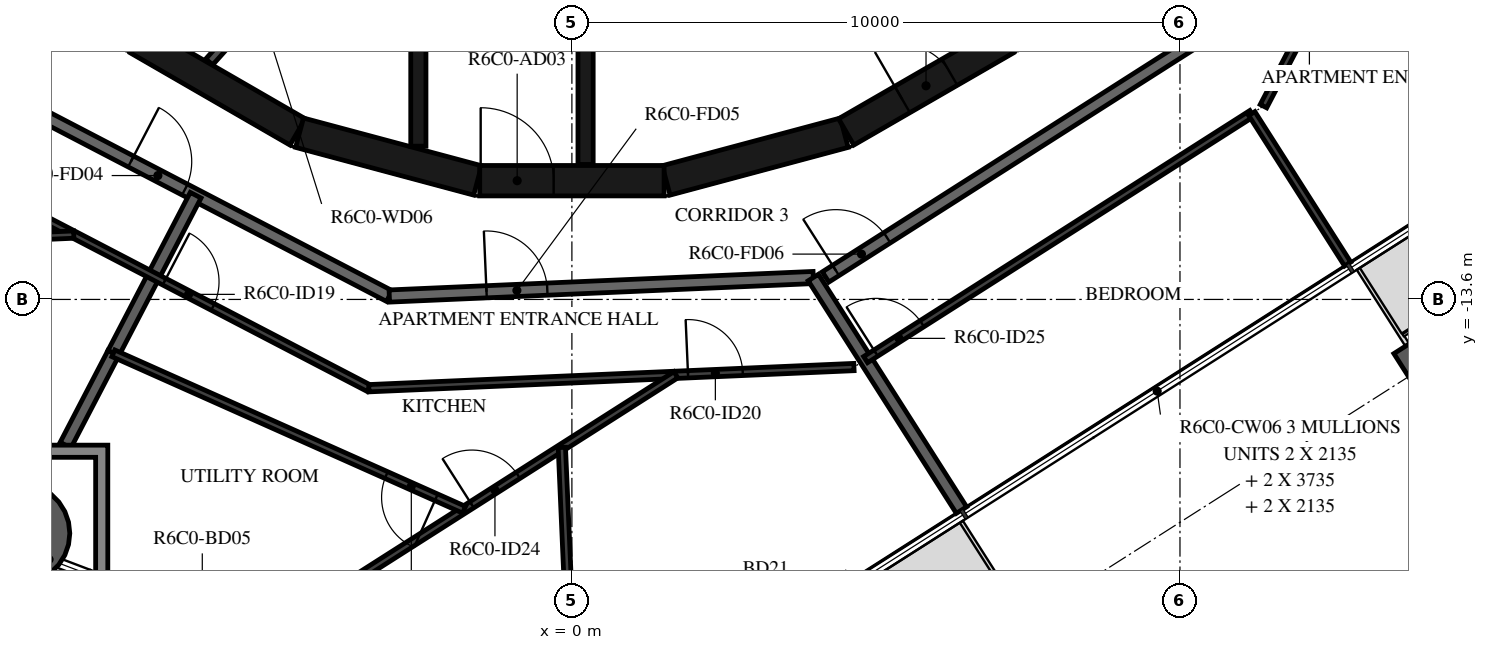
"""IFC4 building model, lengths in metres.
Left out: names, types, materials, properties, quantities, classifications, styles, units other than length and angle.
Written with IfcOpenShell. Run it as: python <this file> out.ifc"""

import sys

from ifc_helpers import new_model, si_unit, direction, frame, frame_2d, origin, origin_2d, place, context, subcontext, project, spatial, polyline, rectangle, hollow_circle, i_section, outline, extrude, element, fill, save


model = new_model("IFC4")
c1 = context("Model", 3, precision=1e-05, world=origin(), true_north=direction((0.0, 1.0)))
c2 = subcontext(c1, "Body", "Model", "MODEL_VIEW")
j1 = project(units=[si_unit("LENGTHUNIT", "METRE"), si_unit("PLANEANGLEUNIT", "RADIAN")], contexts=[c1])
p1 = place(None, origin())
s1 = spatial("IfcSite", under=j1, at=p1, CompositionType="ELEMENT")
p2 = place(p1, origin())
s2 = spatial("IfcBuilding", under=s1, at=p2, CompositionType="ELEMENT")
p3 = place(p2, frame((0.0, 0.0, 254.7)))
s3 = spatial("IfcBuildingStorey", under=s2, at=p3, CompositionType="ELEMENT", Elevation=254.7)
p4 = place(p3, frame((-9.082, -17.446, -0.38), z_axis=(0.0, 0.0, 1.0), x_axis=(1.0, 0.0, 0.0)))
e1 = element("IfcColumn", 1, at=p4, inside=s3, PredefinedType="COLUMN", context=c2, shape_type="SweptSolid", body=[
    extrude(hollow_circle(Radius=0.825, WallThickness=0.04, at=origin_2d()), origin(), (0.0, 0.0, 1.0), 2.616),
])
p5 = place(p3, frame((13.886, -14.79, -0.38), z_axis=(0.0, 0.0, 1.0), x_axis=(-0.843391139633, -0.537300088953, 0.0)))
e2 = element("IfcColumn", 2, at=p5, inside=s3, PredefinedType="COLUMN", context=c2, shape_type="SweptSolid", body=[
    extrude(i_section(OverallWidth=0.3, OverallDepth=0.9, WebThickness=0.019, FlangeThickness=0.035, FilletRadius=0.03, at=origin_2d()), origin(), (0.0, 0.0, 1.0), 2.616),
])
p6 = place(p3, frame((1.55, -11.643, 0.0), z_axis=(0.0, 0.0, 1.0), x_axis=(0.965948410781, 0.258734743916, 0.0)))
e3 = element("IfcWall", 3, at=p6, inside=s3, PredefinedType="SHEAR", context=c2, shape_type="SweptSolid", body=[
    extrude(rectangle(XDim=3.033, YDim=0.5, at=frame_2d((1.516, 0.0))), origin(), (0.0, 0.0, 1.0), 3.05),
])
p7 = place(p3, frame((4.51, -10.845, 0.0), z_axis=(0.0, 0.0, 1.0), x_axis=(0.865975092491, 0.500087131594, 0.0)))
e4 = element("IfcWall", 4, at=p7, inside=s3, PredefinedType="SHEAR", context=c2, shape_type="SweptSolid", body=[
    extrude(rectangle(XDim=3.033, YDim=0.5, at=frame_2d((1.516, 0.0))), origin(), (0.0, 0.0, 1.0), 3.05),
])
p8 = place(p7, frame((1.066, 0.0, 0.0)))
e5 = element("IfcOpeningElement", 5, at=p8, cuts=e4, PredefinedType="OPENING", context=c2, shape_type="SweptSolid", body=[
    extrude(rectangle(XDim=0.9, YDim=2.1, at=frame_2d((0.45, 1.05))), frame((0.0, 0.26, 0.0), z_axis=(0.0, -1.0, 0.0), x_axis=(1.0, 0.0, 0.0)), (0.0, 0.0, 1.0), 0.52),
])
for number, where, z_axis, x_axis in (
    (6, (-7.137, -9.329, 0.0), (0.0, 0.0, 1.0), (0.866, -0.5, 0.0)),
    (7, (-4.479, -10.858, 0.0), (0.0, 0.0, 1.0), (0.966, -0.259, 0.0)),
):
    element("IfcWall", number, at=place(p3, frame(where, z_axis=z_axis, x_axis=x_axis)), inside=s3, PredefinedType="SHEAR", context=c2, shape_type="SweptSolid", body=[
        extrude(rectangle(XDim=3.033, YDim=0.5, at=frame_2d((1.516, 0.0))), origin(), (0.0, 0.0, 1.0), 3.05),
    ])
p9 = place(p3, frame((-1.516, -11.647, 0.0), z_axis=(0.0, 0.0, 1.0), x_axis=(1.0, 0.0, 0.0)))
e8 = element("IfcWall", 8, at=p9, inside=s3, PredefinedType="SHEAR", context=c2, shape_type="SweptSolid", body=[
    extrude(rectangle(XDim=3.033, YDim=0.5, at=frame_2d((1.516, 0.0))), origin(), (0.0, 0.0, 1.0), 3.05),
])
p10 = place(p9, frame((0.016, 0.0, 0.0)))
e9 = element("IfcOpeningElement", 9, at=p10, cuts=e8, PredefinedType="OPENING", context=c2, shape_type="SweptSolid", body=[
    extrude(rectangle(XDim=1.2, YDim=2.1, at=frame_2d((0.6, 1.05))), frame((0.0, 0.26, 0.0), z_axis=(0.0, -1.0, 0.0), x_axis=(1.0, 0.0, 0.0)), (0.0, 0.0, 1.0), 0.52),
])
p11 = place(p3, frame((-2.525, -8.97, 0.0), z_axis=(0.0, 0.0, 1.0), x_axis=(0.0, -1.0, 0.0)))
e10 = element("IfcWall", 10, at=p11, inside=s3, PredefinedType="SHEAR", context=c2, shape_type="SweptSolid", body=[
    extrude(rectangle(XDim=2.11, YDim=0.25, at=frame_2d((1.055, 0.0))), origin(), (0.0, 0.0, 1.0), 3.05),
])
p12 = place(p3, frame((0.225, -8.97, 0.0), z_axis=(0.0, 0.0, 1.0), x_axis=(0.0, -1.0, 0.0)))
e11 = element("IfcWall", 11, at=p12, inside=s3, PredefinedType="SHEAR", context=c2, shape_type="SweptSolid", body=[
    extrude(rectangle(XDim=2.41, YDim=0.25, at=frame_2d((1.205, 0.0))), origin(), (0.0, 0.0, 1.0), 3.05),
])
p13 = place(p3, frame((-4.311, -7.851, 0.0), z_axis=(0.0, 0.0, 1.0), x_axis=(-0.667869133096, -0.744278725383, 0.0)))
e12 = element("IfcWall", 12, at=p13, inside=s3, PredefinedType="PARTITIONING", context=c2, shape_type="SweptSolid", body=[
    extrude(rectangle(XDim=2.476, YDim=0.15, at=frame_2d((1.238, 0.0))), origin(), (0.0, 0.0, 1.0), 3.05),
])
p14 = place(p13, frame((0.788, 0.0, 0.0)))
e13 = element("IfcOpeningElement", 13, at=p14, cuts=e12, PredefinedType="OPENING", context=c2, shape_type="SweptSolid", body=[
    extrude(rectangle(XDim=0.9, YDim=2.1, at=frame_2d((0.45, 1.05))), frame((0.0, 0.085, 0.0), z_axis=(0.0, -1.0, 0.0), x_axis=(1.0, 0.0, 0.0)), (0.0, 0.0, 1.0), 0.17),
])
p15 = place(p3, frame((-9.372, -10.228, 0.0), z_axis=(0.0, 0.0, 1.0), x_axis=(0.887005184532, -0.461759464021, 0.0)))
e14 = element("IfcWall", 14, at=p15, inside=s3, PredefinedType="STANDARD", context=c2, shape_type="SweptSolid", body=[
    extrude(rectangle(XDim=7.181, YDim=0.2, at=frame_2d((3.591, 0.0))), origin(), (0.0, 0.0, 1.0), 3.05),
])
p16 = place(p15, frame((2.391, 0.0, 0.0)))
e15 = element("IfcOpeningElement", 15, at=p16, cuts=e14, PredefinedType="OPENING", context=c2, shape_type="SweptSolid", body=[
    extrude(rectangle(XDim=1.0, YDim=2.1, at=frame_2d((0.5, 1.05))), frame((0.0, 0.11, 0.0), z_axis=(0.0, -1.0, 0.0), x_axis=(1.0, 0.0, 0.0)), (0.0, 0.0, 1.0), 0.22),
])
p17 = place(p3, frame((-3.003, -13.544, 0.0), z_axis=(0.0, 0.0, 1.0), x_axis=(0.999048221872, 0.043619380718, 0.0)))
e16 = element("IfcWall", 16, at=p17, inside=s3, PredefinedType="STANDARD", context=c2, shape_type="SweptSolid", body=[
    extrude(rectangle(XDim=6.979, YDim=0.2, at=frame_2d((3.49, 0.0))), origin(), (0.0, 0.0, 1.0), 3.05),
])
p18 = place(p17, frame((1.6, 0.0, 0.0)))
e17 = element("IfcOpeningElement", 17, at=p18, cuts=e16, PredefinedType="OPENING", context=c2, shape_type="SweptSolid", body=[
    extrude(rectangle(XDim=1.0, YDim=2.1, at=frame_2d((0.5, 1.05))), frame((0.0, 0.11, 0.0), z_axis=(0.0, -1.0, 0.0), x_axis=(1.0, 0.0, 0.0)), (0.0, 0.0, 1.0), 0.22),
])
p19 = place(p3, frame((4.172, -13.231, 0.0), z_axis=(0.0, 0.0, 1.0), x_axis=(0.843388394728, 0.537304397561, 0.0)))
e18 = element("IfcWall", 18, at=p19, inside=s3, PredefinedType="STANDARD", context=c2, shape_type="SweptSolid", body=[
    extrude(rectangle(XDim=7.181, YDim=0.2, at=frame_2d((3.59, 0.0))), origin(), (0.0, 0.0, 1.0), 3.05),
])
p20 = place(p19, frame((0.2, 0.0, 0.0)))
e19 = element("IfcOpeningElement", 19, at=p20, cuts=e18, PredefinedType="OPENING", context=c2, shape_type="SweptSolid", body=[
    extrude(rectangle(XDim=1.0, YDim=2.1, at=frame_2d((0.5, 1.05))), frame((0.0, 0.11, 0.0), z_axis=(0.0, -1.0, 0.0), x_axis=(1.0, 0.0, 0.0)), (0.0, 0.0, 1.0), 0.22),
])
p21 = place(p3, frame((-7.541, -14.486, 0.0), z_axis=(0.0, 0.0, 1.0), x_axis=(0.461746051786, 0.88701216658, 0.0)))
e20 = element("IfcWall", 20, at=p21, inside=s3, PredefinedType="STANDARD", context=c2, shape_type="SweptSolid", body=[
    extrude(rectangle(XDim=2.931, YDim=0.2, at=frame_2d((1.466, 0.0))), origin(), (0.0, 0.0, 1.0), 3.05),
])
p22 = place(p3, frame((-8.327, -15.996, 0.0), z_axis=(0.0, 0.0, 1.0), x_axis=(0.461722915657, 0.887024210017, 0.0)))
e21 = element("IfcWall", 21, at=p22, inside=s3, PredefinedType="STANDARD", context=c2, shape_type="SweptSolid", body=[
    extrude(rectangle(XDim=1.703, YDim=0.2, at=frame_2d((0.851, 0.0))), origin(), (0.0, 0.0, 1.0), 3.05),
])
p23 = place(p3, frame((6.407, -17.064, 0.0), z_axis=(0.0, 0.0, 1.0), x_axis=(-0.537324777979, 0.843375410461, 0.0)))
e22 = element("IfcWall", 22, at=p23, inside=s3, PredefinedType="STANDARD", context=c2, shape_type="SweptSolid", body=[
    extrude(rectangle(XDim=4.535, YDim=0.2, at=frame_2d((2.268, 0.0))), origin(), (0.0, 0.0, 1.0), 3.05),
])
p24 = place(p3, frame((-10.421, -11.373, 0.0), z_axis=(0.0, 0.0, 1.0), x_axis=(0.887012970857, -0.461744506769, 0.0)))
e23 = element("IfcWall", 23, at=p24, inside=s3, PredefinedType="PARTITIONING", context=c2, shape_type="SweptSolid", body=[
    extrude(rectangle(XDim=7.985, YDim=0.12, at=frame_2d((3.992, 0.0))), origin(), (0.0, 0.0, 1.0), 3.05),
])
p25 = place(p24, frame((4.192, 0.0, 0.0)))
e24 = element("IfcOpeningElement", 24, at=p25, cuts=e23, PredefinedType="OPENING", context=c2, shape_type="SweptSolid", body=[
    extrude(rectangle(XDim=0.9, YDim=2.1, at=frame_2d((0.45, 1.05))), frame((0.0, 0.07, 0.0), z_axis=(0.0, -1.0, 0.0), x_axis=(1.0, 0.0, 0.0)), (0.0, 0.0, 1.0), 0.14),
])
p26 = place(p3, frame((-13.69, -12.774, 0.0), z_axis=(0.0, 0.0, 1.0), x_axis=(0.999048778431, 0.043606631553, 0.0)))
e25 = element("IfcWall", 25, at=p26, inside=s3, PredefinedType="PARTITIONING", context=c2, shape_type="SweptSolid", body=[
    extrude(rectangle(XDim=5.503, YDim=0.12, at=frame_2d((2.752, 0.0))), origin(), (0.0, 0.0, 1.0), 3.05),
])
p27 = place(p26, frame((0.6, 0.0, 0.0)))
e26 = element("IfcOpeningElement", 26, at=p27, cuts=e25, PredefinedType="OPENING", context=c2, shape_type="SweptSolid", body=[
    extrude(rectangle(XDim=0.9, YDim=2.1, at=frame_2d((0.45, 1.05))), frame((0.0, 0.07, 0.0), z_axis=(0.0, -1.0, 0.0), x_axis=(1.0, 0.0, 0.0)), (0.0, 0.0, 1.0), 0.14),
])
p28 = place(p3, frame((-3.339, -15.06, 0.0), z_axis=(0.0, 0.0, 1.0), x_axis=(0.999047716945, 0.043630943905, 0.0)))
e27 = element("IfcWall", 27, at=p28, inside=s3, PredefinedType="PARTITIONING", context=c2, shape_type="SweptSolid", body=[
    extrude(rectangle(XDim=7.985, YDim=0.12, at=frame_2d((3.992, 0.0))), origin(), (0.0, 0.0, 1.0), 3.05),
])
p29 = place(p28, frame((5.253, 0.0, 0.0)))
e28 = element("IfcOpeningElement", 28, at=p29, cuts=e27, PredefinedType="OPENING", context=c2, shape_type="SweptSolid", body=[
    extrude(rectangle(XDim=0.9, YDim=2.1, at=frame_2d((0.45, 1.05))), frame((0.0, 0.07, 0.0), z_axis=(0.0, -1.0, 0.0), x_axis=(1.0, 0.0, 0.0)), (0.0, 0.0, 1.0), 0.14),
])
p30 = place(p3, frame((-6.932, -20.345, 0.0), z_axis=(0.0, 0.0, 1.0), x_axis=(0.843388627156, 0.537304032726, 0.0)))
e29 = element("IfcWall", 29, at=p30, inside=s3, PredefinedType="PARTITIONING", context=c2, shape_type="SweptSolid", body=[
    extrude(rectangle(XDim=10.246, YDim=0.12, at=frame_2d((5.123, 0.0))), origin(), (0.0, 0.0, 1.0), 3.05),
])
p31 = place(p30, frame((2.138, 0.0, 0.0)))
e30 = element("IfcOpeningElement", 30, at=p31, cuts=e29, PredefinedType="OPENING", context=c2, shape_type="SweptSolid", body=[
    extrude(rectangle(XDim=0.9, YDim=2.1, at=frame_2d((0.45, 1.05))), frame((0.0, 0.07, 0.0), z_axis=(0.0, -1.0, 0.0), x_axis=(1.0, 0.0, 0.0)), (0.0, 0.0, 1.0), 0.14),
])
p32 = place(p30, frame((6.268, 0.0, 0.0)))
e31 = element("IfcOpeningElement", 31, at=p32, cuts=e29, PredefinedType="OPENING", context=c2, shape_type="SweptSolid", body=[
    extrude(rectangle(XDim=0.9, YDim=2.1, at=frame_2d((0.45, 1.05))), frame((0.0, 0.07, 0.0), z_axis=(0.0, -1.0, 0.0), x_axis=(1.0, 0.0, 0.0)), (0.0, 0.0, 1.0), 0.14),
])
p33 = place(p3, frame((-1.773, -17.059, 0.0), z_axis=(0.0, 0.0, 1.0), x_axis=(-0.913279926902, 0.407332511736, 0.0)))
e32 = element("IfcWall", 32, at=p33, inside=s3, PredefinedType="PARTITIONING", context=c2, shape_type="SweptSolid", body=[
    extrude(rectangle(XDim=6.315, YDim=0.12, at=frame_2d((3.158, 0.0))), origin(), (0.0, 0.0, 1.0), 3.05),
])
p34 = place(p33, frame((0.5, 0.0, 0.0)))
e33 = element("IfcOpeningElement", 33, at=p34, cuts=e32, PredefinedType="OPENING", context=c2, shape_type="SweptSolid", body=[
    extrude(rectangle(XDim=0.9, YDim=2.1, at=frame_2d((0.45, 1.05))), frame((0.0, 0.07, 0.0), z_axis=(0.0, -1.0, 0.0), x_axis=(1.0, 0.0, 0.0)), (0.0, 0.0, 1.0), 0.14),
])
p35 = place(p3, frame((0.056, -21.11, 0.0), z_axis=(0.0, 0.0, 1.0), x_axis=(-0.043583193193, 0.999049801197, 0.0)))
e34 = element("IfcWall", 34, at=p35, inside=s3, PredefinedType="PARTITIONING", context=c2, shape_type="SweptSolid", body=[
    extrude(rectangle(XDim=5.081, YDim=0.12, at=frame_2d((2.541, 0.0))), origin(), (0.0, 0.0, 1.0), 3.05),
])
p36 = place(p3, frame((4.83, -14.59, 0.0), z_axis=(0.0, 0.0, 1.0), x_axis=(0.843393042763, 0.537297101629, 0.0)))
e35 = element("IfcWall", 35, at=p36, inside=s3, PredefinedType="PARTITIONING", context=c2, shape_type="SweptSolid", body=[
    extrude(rectangle(XDim=7.53, YDim=0.12, at=frame_2d((3.765, 0.0))), origin(), (0.0, 0.0, 1.0), 3.05),
])
p37 = place(p36, frame((0.2, 0.0, 0.0)))
e36 = element("IfcOpeningElement", 36, at=p37, cuts=e35, PredefinedType="OPENING", context=c2, shape_type="SweptSolid", body=[
    extrude(rectangle(XDim=0.9, YDim=2.1, at=frame_2d((0.45, 1.05))), frame((0.0, 0.07, 0.0), z_axis=(0.0, -1.0, 0.0), x_axis=(1.0, 0.0, 0.0)), (0.0, 0.0, 1.0), 0.14),
])
p38 = place(p3, frame((11.373, -10.421, 0.0), z_axis=(0.0, 0.0, 1.0), x_axis=(0.461738939635, 0.887015868869, 0.0)))
e37 = element("IfcWall", 37, at=p38, inside=s3, PredefinedType="PARTITIONING", context=c2, shape_type="SweptSolid", body=[
    extrude(rectangle(XDim=5.752, YDim=0.12, at=frame_2d((2.876, 0.0))), origin(), (0.0, 0.0, 1.0), 3.05),
])
p39 = place(p38, frame((2.831, 0.0, 0.0)))
e38 = element("IfcOpeningElement", 38, at=p39, cuts=e37, PredefinedType="OPENING", context=c2, shape_type="SweptSolid", body=[
    extrude(rectangle(XDim=0.8, YDim=2.1, at=frame_2d((0.4, 1.05))), frame((0.0, 0.07, 0.0), z_axis=(0.0, -1.0, 0.0), x_axis=(1.0, 0.0, 0.0)), (0.0, 0.0, 1.0), 0.14),
])
p40 = place(p3, frame((12.758, -13.018, 0.0), z_axis=(0.0, 0.0, 1.0), x_axis=(-0.537338423153, 0.843366716798, 0.0)))
e39 = element("IfcWall", 39, at=p40, inside=s3, PredefinedType="PARTITIONING", context=c2, shape_type="SweptSolid", body=[
    extrude(rectangle(XDim=2.934, YDim=0.12, at=frame_2d((1.467, 0.0))), origin(), (0.0, 0.0, 1.0), 3.05),
])
p41 = place(p3, origin())
e40 = element("IfcWall", 40, at=p41, inside=s3, PredefinedType="STANDARD", context=c2, shape_type="SweptSolid", body=[
    extrude(outline(polyline([(-7.632, -15.996), (-7.632, -18.896), (-10.532, -18.896), (-10.532, -15.996), (-7.632, -15.996)]), holes=[polyline([(-10.332, -18.696), (-7.832, -18.696), (-7.832, -16.196), (-10.332, -16.196), (-10.332, -18.696)])]), origin(), (0.0, 0.0, 1.0), 3.05),
])
p42 = place(p10, origin())
e41 = element("IfcDoor", 41, at=p42, inside=s3, OperationType="SINGLE_SWING_RIGHT", PredefinedType="DOOR", context=c2, shape_type="SweptSolid", body=[
    extrude(rectangle(XDim=1.2, YDim=2.1, at=frame_2d((0.6, 1.05))), frame((0.0, 0.025, 0.0), z_axis=(0.0, -1.0, 0.0), x_axis=(1.0, 0.0, 0.0)), (0.0, 0.0, 1.0), 0.05),
])
fill(e9, e41)
p43 = place(p8, origin())
e42 = element("IfcDoor", 42, at=p43, inside=s3, OperationType="SINGLE_SWING_RIGHT", PredefinedType="DOOR", context=c2, shape_type="SweptSolid", body=[
    extrude(rectangle(XDim=0.9, YDim=2.1, at=frame_2d((0.45, 1.05))), frame((0.0, 0.025, 0.0), z_axis=(0.0, -1.0, 0.0), x_axis=(1.0, 0.0, 0.0)), (0.0, 0.0, 1.0), 0.05),
])
fill(e5, e42)
p44 = place(p16, origin())
e43 = element("IfcDoor", 43, at=p44, inside=s3, OperationType="SINGLE_SWING_RIGHT", PredefinedType="DOOR", context=c2, shape_type="SweptSolid", body=[
    extrude(rectangle(XDim=1.0, YDim=2.1, at=frame_2d((0.5, 1.05))), frame((0.0, 0.025, 0.0), z_axis=(0.0, -1.0, 0.0), x_axis=(1.0, 0.0, 0.0)), (0.0, 0.0, 1.0), 0.05),
])
fill(e15, e43)
p45 = place(p18, origin())
e44 = element("IfcDoor", 44, at=p45, inside=s3, OperationType="SINGLE_SWING_LEFT", PredefinedType="DOOR", context=c2, shape_type="SweptSolid", body=[
    extrude(rectangle(XDim=1.0, YDim=2.1, at=frame_2d((0.5, 1.05))), frame((0.0, 0.025, 0.0), z_axis=(0.0, -1.0, 0.0), x_axis=(1.0, 0.0, 0.0)), (0.0, 0.0, 1.0), 0.05),
])
fill(e17, e44)
p46 = place(p25, origin())
e45 = element("IfcDoor", 45, at=p46, inside=s3, OperationType="SINGLE_SWING_LEFT", PredefinedType="DOOR", context=c2, shape_type="SweptSolid", body=[
    extrude(rectangle(XDim=0.9, YDim=2.1, at=frame_2d((0.45, 1.05))), frame((0.0, 0.025, 0.0), z_axis=(0.0, -1.0, 0.0), x_axis=(1.0, 0.0, 0.0)), (0.0, 0.0, 1.0), 0.05),
])
fill(e24, e45)
p47 = place(p29, origin())
e46 = element("IfcDoor", 46, at=p47, inside=s3, OperationType="SINGLE_SWING_LEFT", PredefinedType="DOOR", context=c2, shape_type="SweptSolid", body=[
    extrude(rectangle(XDim=0.9, YDim=2.1, at=frame_2d((0.45, 1.05))), frame((0.0, 0.025, 0.0), z_axis=(0.0, -1.0, 0.0), x_axis=(1.0, 0.0, 0.0)), (0.0, 0.0, 1.0), 0.05),
])
fill(e28, e46)
p48 = place(p34, origin())
e47 = element("IfcDoor", 47, at=p48, inside=s3, OperationType="SINGLE_SWING_LEFT", PredefinedType="DOOR", context=c2, shape_type="SweptSolid", body=[
    extrude(rectangle(XDim=0.9, YDim=2.1, at=frame_2d((0.45, 1.05))), frame((0.0, 0.025, 0.0), z_axis=(0.0, -1.0, 0.0), x_axis=(1.0, 0.0, 0.0)), (0.0, 0.0, 1.0), 0.05),
])
fill(e33, e47)
p49 = place(p32, origin())
e48 = element("IfcDoor", 48, at=p49, inside=s3, OperationType="SINGLE_SWING_RIGHT", PredefinedType="DOOR", context=c2, shape_type="SweptSolid", body=[
    extrude(rectangle(XDim=0.9, YDim=2.1, at=frame_2d((0.45, 1.05))), frame((0.0, 0.025, 0.0), z_axis=(0.0, -1.0, 0.0), x_axis=(1.0, 0.0, 0.0)), (0.0, 0.0, 1.0), 0.05),
])
fill(e31, e48)
p50 = place(p20, origin())
e49 = element("IfcDoor", 49, at=p50, inside=s3, OperationType="SINGLE_SWING_LEFT", PredefinedType="DOOR", context=c2, shape_type="SweptSolid", body=[
    extrude(rectangle(XDim=1.0, YDim=2.1, at=frame_2d((0.5, 1.05))), frame((0.0, 0.025, 0.0), z_axis=(0.0, -1.0, 0.0), x_axis=(1.0, 0.0, 0.0)), (0.0, 0.0, 1.0), 0.05),
])
fill(e19, e49)
p51 = place(p37, origin())
e50 = element("IfcDoor", 50, at=p51, inside=s3, OperationType="SINGLE_SWING_LEFT", PredefinedType="DOOR", context=c2, shape_type="SweptSolid", body=[
    extrude(rectangle(XDim=0.9, YDim=2.1, at=frame_2d((0.45, 1.05))), frame((0.0, 0.025, 0.0), z_axis=(0.0, -1.0, 0.0), x_axis=(1.0, 0.0, 0.0)), (0.0, 0.0, 1.0), 0.05),
])
fill(e36, e50)
save(model, sys.argv[1])
